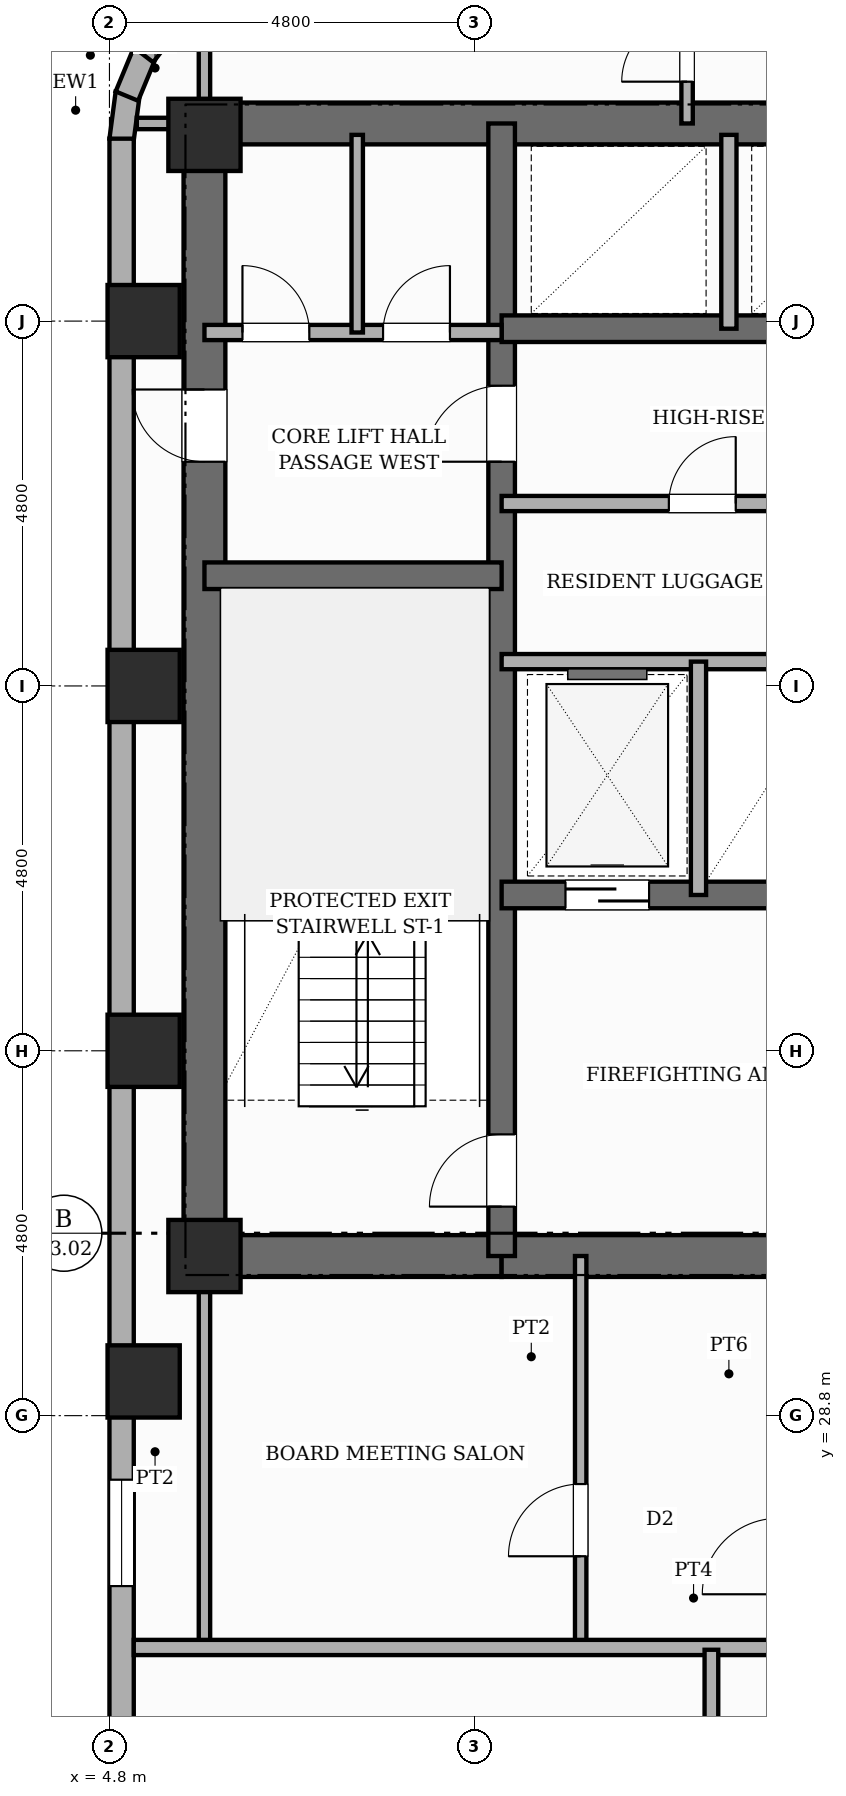
"""IFC4 building model, lengths in metres.
Left out: names, types, materials, properties, quantities, classifications, styles, units other than length and angle.
Written with IfcOpenShell. Run it as: python <this file> out.ifc"""

import sys

from ifc_helpers import new_model, si_unit, direction, frame, frame_2d, origin, origin_2d, place, context, subcontext, project, spatial, rectangle, extrude, element, fill, save


model = new_model("IFC4")
c1 = context("Model", 3, precision=1e-05, world=origin(), true_north=direction((0.0, 1.0)))
c2 = subcontext(c1, "Body", "Model", "MODEL_VIEW")
j1 = project(units=[si_unit("LENGTHUNIT", "METRE"), si_unit("PLANEANGLEUNIT", "RADIAN")], contexts=[c1])
p1 = place(None, origin())
s1 = spatial("IfcSite", under=j1, at=p1, CompositionType="ELEMENT")
p2 = place(p1, origin())
s2 = spatial("IfcBuilding", under=s1, at=p2, CompositionType="ELEMENT")
p3 = place(p2, frame((0.0, 0.0, 154.0)))
s3 = spatial("IfcBuildingStorey", under=s2, at=p3, CompositionType="ELEMENT", Elevation=154.0)
p4 = place(p3, frame((6.05, 30.625, 0.0), z_axis=(0.0, 0.0, 1.0), x_axis=(0.0, 1.0, 0.0)))
e1 = element("IfcWall", 1, at=p4, inside=s3, PredefinedType="SHEAR", context=c2, shape_type="SweptSolid", body=[
    extrude(rectangle(XDim=15.45, YDim=0.55, at=frame_2d((7.725, 0.0))), origin(), (0.0, 0.0, 1.0), 3.6),
])
p5 = place(p4, frame((10.725, 0.0, 0.0)))
e2 = element("IfcOpeningElement", 2, at=p5, cuts=e1, PredefinedType="OPENING", context=c2, shape_type="SweptSolid", body=[
    extrude(rectangle(XDim=0.95, YDim=2.15, at=frame_2d((0.475, 1.075))), frame((0.0, 0.285, 0.0), z_axis=(0.0, -1.0, 0.0), x_axis=(1.0, 0.0, 0.0)), (0.0, 0.0, 1.0), 0.57),
])
p6 = place(p3, frame((6.05, 45.8, 0.0), z_axis=(0.0, 0.0, 1.0), x_axis=(1.0, 0.0, 0.0)))
e3 = element("IfcWall", 3, at=p6, inside=s3, PredefinedType="SHEAR", context=c2, shape_type="SweptSolid", body=[
    extrude(rectangle(XDim=16.7, YDim=0.55, at=frame_2d((8.35, 0.0))), origin(), (0.0, 0.0, 1.0), 3.6),
])
p7 = place(p3, frame((6.05, 30.9, 0.0), z_axis=(0.0, 0.0, 1.0), x_axis=(1.0, 0.0, 0.0)))
e4 = element("IfcWall", 4, at=p7, inside=s3, PredefinedType="SHEAR", context=c2, shape_type="SweptSolid", body=[
    extrude(rectangle(XDim=3.91, YDim=0.55, at=frame_2d((1.955, 0.0))), origin(), (0.0, 0.0, 1.0), 3.6),
])
p8 = place(p3, frame((9.96, 30.9, 0.0), z_axis=(0.0, 0.0, 1.0), x_axis=(1.0, 0.0, 0.0)))
e5 = element("IfcWall", 5, at=p8, inside=s3, PredefinedType="SHEAR", context=c2, shape_type="SweptSolid", body=[
    extrude(rectangle(XDim=8.88, YDim=0.55, at=frame_2d((4.44, 0.0))), origin(), (0.0, 0.0, 1.0), 3.6),
])
p9 = place(p8, frame((4.09, 0.0, 0.0)))
e6 = element("IfcOpeningElement", 6, at=p9, cuts=e5, PredefinedType="OPENING", context=c2, shape_type="SweptSolid", body=[
    extrude(rectangle(XDim=1.0, YDim=2.15, at=frame_2d((0.5, 1.075))), frame((0.0, 0.285, 0.0), z_axis=(0.0, -1.0, 0.0), x_axis=(1.0, 0.0, 0.0)), (0.0, 0.0, 1.0), 0.57),
])
p10 = place(p3, frame((9.96, 30.9, 0.0), z_axis=(0.0, 0.0, 1.0), x_axis=(0.0, 1.0, 0.0)))
e7 = element("IfcWall", 7, at=p10, inside=s3, PredefinedType="SHEAR", context=c2, shape_type="SweptSolid", body=[
    extrude(rectangle(XDim=14.9, YDim=0.35, at=frame_2d((7.45, 0.0))), origin(), (0.0, 0.0, 1.0), 3.6),
])
p11 = place(p10, frame((0.65, 0.0, 0.0)))
e8 = element("IfcOpeningElement", 8, at=p11, cuts=e7, PredefinedType="OPENING", context=c2, shape_type="SweptSolid", body=[
    extrude(rectangle(XDim=0.95, YDim=2.1, at=frame_2d((0.475, 1.05))), frame((0.0, 0.185, 0.0), z_axis=(0.0, -1.0, 0.0), x_axis=(1.0, 0.0, 0.0)), (0.0, 0.0, 1.0), 0.37),
])
p12 = place(p10, frame((10.45, 0.0, 0.0)))
e9 = element("IfcOpeningElement", 9, at=p12, cuts=e7, PredefinedType="OPENING", context=c2, shape_type="SweptSolid", body=[
    extrude(rectangle(XDim=1.0, YDim=2.15, at=frame_2d((0.5, 1.075))), frame((0.0, 0.185, 0.0), z_axis=(0.0, -1.0, 0.0), x_axis=(1.0, 0.0, 0.0)), (0.0, 0.0, 1.0), 0.37),
])
p13 = place(p3, frame((6.05, 39.85, 0.0), z_axis=(0.0, 0.0, 1.0), x_axis=(1.0, 0.0, 0.0)))
e10 = element("IfcWall", 10, at=p13, inside=s3, PredefinedType="SHEAR", context=c2, shape_type="SweptSolid", body=[
    extrude(rectangle(XDim=3.91, YDim=0.35, at=frame_2d((1.955, 0.0))), origin(), (0.0, 0.0, 1.0), 3.6),
])
p14 = place(p3, frame((9.96, 35.65, 0.0), z_axis=(0.0, 0.0, 1.0), x_axis=(1.0, 0.0, 0.0)))
e11 = element("IfcWall", 11, at=p14, inside=s3, PredefinedType="SHEAR", context=c2, shape_type="SweptSolid", body=[
    extrude(rectangle(XDim=8.88, YDim=0.35, at=frame_2d((4.44, 0.0))), origin(), (0.0, 0.0, 1.0), 3.6),
])
p15 = place(p14, frame((0.84, 0.0, 0.0)))
e12 = element("IfcOpeningElement", 12, at=p15, cuts=e11, PredefinedType="OPENING", context=c2, shape_type="SweptSolid", body=[
    extrude(rectangle(XDim=1.1, YDim=2.15, at=frame_2d((0.55, 1.075))), frame((0.0, 0.185, 0.0), z_axis=(0.0, -1.0, 0.0), x_axis=(1.0, 0.0, 0.0)), (0.0, 0.0, 1.0), 0.37),
])
p16 = place(p14, frame((5.24, 0.0, 0.0)))
e13 = element("IfcOpeningElement", 13, at=p16, cuts=e11, PredefinedType="OPENING", context=c2, shape_type="SweptSolid", body=[
    extrude(rectangle(XDim=1.1, YDim=2.15, at=frame_2d((0.55, 1.075))), frame((0.0, 0.185, 0.0), z_axis=(0.0, -1.0, 0.0), x_axis=(1.0, 0.0, 0.0)), (0.0, 0.0, 1.0), 0.37),
])
p17 = place(p14, frame((7.5, 0.0, 0.0)))
e14 = element("IfcOpeningElement", 14, at=p17, cuts=e11, PredefinedType="OPENING", context=c2, shape_type="SweptSolid", body=[
    extrude(rectangle(XDim=0.88, YDim=2.1, at=frame_2d((0.44, 1.05))), frame((0.0, 0.185, 0.0), z_axis=(0.0, -1.0, 0.0), x_axis=(1.0, 0.0, 0.0)), (0.0, 0.0, 1.0), 0.37),
])
p18 = place(p3, frame((9.96, 43.1, 0.0), z_axis=(0.0, 0.0, 1.0), x_axis=(1.0, 0.0, 0.0)))
e15 = element("IfcWall", 15, at=p18, inside=s3, PredefinedType="SHEAR", context=c2, shape_type="SweptSolid", body=[
    extrude(rectangle(XDim=8.88, YDim=0.35, at=frame_2d((4.44, 0.0))), origin(), (0.0, 0.0, 1.0), 3.6),
])
for number, where, z_axis, x_axis in (
    (16, (5.25, 29.25, 0.0), (0.0, 0.0, 1.0), (1.0, 0.0, 0.0)),
    (17, (5.25, 33.6, 0.0), (0.0, 0.0, 1.0), (1.0, 0.0, 0.0)),
    (18, (5.25, 38.4, 0.0), (0.0, 0.0, 1.0), (1.0, 0.0, 0.0)),
    (19, (5.25, 43.2, 0.0), (0.0, 0.0, 1.0), (1.0, 0.0, 0.0)),
    (20, (6.05, 30.9, 0.0), (0.0, 0.0, 1.0), (1.0, 0.0, 0.0)),
    (21, (6.05, 45.65, 0.0), (0.0, 0.0, 1.0), (1.0, 0.0, 0.0)),
):
    element("IfcColumn", number, at=place(p3, frame(where, z_axis=z_axis, x_axis=x_axis)), inside=s3, PredefinedType="COLUMN", context=c2, shape_type="SweptSolid", body=[
        extrude(rectangle(XDim=0.95, YDim=0.95, at=origin_2d()), origin(), (0.0, 0.0, 1.0), 3.6),
    ])
for number, where, z_axis, x_axis in (
    (22, (4.958, 45.579, 0.0), (0.0, 0.0, 1.0), (0.131, 0.991, 0.0)),
    (23, (5.03, 46.16, 0.0), (0.0, 0.0, 1.0), (0.383, 0.924, 0.0)),
):
    element("IfcWall", number, at=place(p3, frame(where, z_axis=z_axis, x_axis=x_axis)), inside=s3, PredefinedType="STANDARD", context=c2, shape_type="SweptSolid", body=[
        extrude(rectangle(XDim=0.626, YDim=0.32, at=frame_2d((0.313, 0.0))), origin(), (0.0, 0.0, 1.0), 3.36),
    ])
p19 = place(p3, frame((5.248, 46.703, 0.0), z_axis=(0.0, 0.0, 1.0), x_axis=(0.608938521285, 0.7932174212, 0.0)))
e24 = element("IfcWall", 24, at=p19, inside=s3, PredefinedType="STANDARD", context=c2, shape_type="SweptSolid", body=[
    extrude(rectangle(XDim=0.627, YDim=0.32, at=frame_2d((0.313, 0.0))), origin(), (0.0, 0.0, 1.0), 3.36),
])
p20 = place(p3, frame((4.96, 12.0, 0.0), z_axis=(0.0, 0.0, 1.0), x_axis=(0.0, 1.0, 0.0)))
e25 = element("IfcWall", 25, at=p20, inside=s3, PredefinedType="STANDARD", context=c2, shape_type="SweptSolid", body=[
    extrude(rectangle(XDim=33.6, YDim=0.32, at=frame_2d((16.8, 0.0))), origin(), (0.0, 0.0, 1.0), 2.54),
])
p21 = place(p20, frame((9.05, 0.0, 0.0)))
e26 = element("IfcOpeningElement", 26, at=p21, cuts=e25, PredefinedType="OPENING", context=c2, shape_type="SweptSolid", body=[
    extrude(rectangle(XDim=1.1, YDim=2.15, at=frame_2d((0.55, 1.075))), frame((0.0, 0.17, 0.0), z_axis=(0.0, -1.0, 0.0), x_axis=(1.0, 0.0, 0.0)), (0.0, 0.0, 1.0), 0.34),
])
p22 = place(p20, frame((3.335, 0.0, 0.65)))
e27 = element("IfcOpeningElement", 27, at=p22, cuts=e25, PredefinedType="OPENING", context=c2, shape_type="SweptSolid", body=[
    extrude(rectangle(XDim=1.4, YDim=1.1, at=frame_2d((0.7, 0.55))), frame((0.0, 0.17, 0.0), z_axis=(0.0, -1.0, 0.0), x_axis=(1.0, 0.0, 0.0)), (0.0, 0.0, 1.0), 0.34),
])
p23 = place(p20, frame((0.683, 0.0, 0.45)))
e28 = element("IfcOpeningElement", 28, at=p23, cuts=e25, PredefinedType="OPENING", context=c2, shape_type="SweptSolid", body=[
    extrude(rectangle(XDim=0.95, YDim=1.8, at=frame_2d((0.475, 0.9))), frame((0.0, 0.17, 0.0), z_axis=(0.0, -1.0, 0.0), x_axis=(1.0, 0.0, 0.0)), (0.0, 0.0, 1.0), 0.34),
])
p24 = place(p20, frame((5.466, 0.0, 0.45)))
e29 = element("IfcOpeningElement", 29, at=p24, cuts=e25, PredefinedType="OPENING", context=c2, shape_type="SweptSolid", body=[
    extrude(rectangle(XDim=0.95, YDim=1.8, at=frame_2d((0.475, 0.9))), frame((0.0, 0.17, 0.0), z_axis=(0.0, -1.0, 0.0), x_axis=(1.0, 0.0, 0.0)), (0.0, 0.0, 1.0), 0.34),
])
p25 = place(p20, frame((10.548, 0.0, 0.45)))
e30 = element("IfcOpeningElement", 30, at=p25, cuts=e25, PredefinedType="OPENING", context=c2, shape_type="SweptSolid", body=[
    extrude(rectangle(XDim=0.75, YDim=1.8, at=frame_2d((0.375, 0.9))), frame((0.0, 0.17, 0.0), z_axis=(0.0, -1.0, 0.0), x_axis=(1.0, 0.0, 0.0)), (0.0, 0.0, 1.0), 0.34),
])
p26 = place(p20, frame((14.558, 0.0, 0.65)))
e31 = element("IfcOpeningElement", 31, at=p26, cuts=e25, PredefinedType="OPENING", context=c2, shape_type="SweptSolid", body=[
    extrude(rectangle(XDim=1.4, YDim=1.1, at=frame_2d((0.7, 0.55))), frame((0.0, 0.17, 0.0), z_axis=(0.0, -1.0, 0.0), x_axis=(1.0, 0.0, 0.0)), (0.0, 0.0, 1.0), 0.34),
])
p27 = place(p3, frame((9.96, 38.72, 0.0), z_axis=(0.0, 0.0, 1.0), x_axis=(1.0, 0.0, 0.0)))
e32 = element("IfcWall", 32, at=p27, inside=s3, PredefinedType="POLYGONAL", context=c2, shape_type="SweptSolid", body=[
    extrude(rectangle(XDim=7.06, YDim=0.2, at=frame_2d((3.53, 0.0))), origin(), (0.0, 0.0, 1.0), 3.36),
])
p28 = place(p3, frame((12.55, 35.65, 0.0), z_axis=(0.0, 0.0, 1.0), x_axis=(0.0, 1.0, 0.0)))
e33 = element("IfcWall", 33, at=p28, inside=s3, PredefinedType="POLYGONAL", context=c2, shape_type="SweptSolid", body=[
    extrude(rectangle(XDim=3.07, YDim=0.2, at=frame_2d((1.535, 0.0))), origin(), (0.0, 0.0, 1.0), 3.36),
])
p29 = place(p3, frame((9.96, 40.8, 0.0), z_axis=(0.0, 0.0, 1.0), x_axis=(1.0, 0.0, 0.0)))
e34 = element("IfcWall", 34, at=p29, inside=s3, PredefinedType="POLYGONAL", context=c2, shape_type="SweptSolid", body=[
    extrude(rectangle(XDim=8.88, YDim=0.2, at=frame_2d((4.44, 0.0))), origin(), (0.0, 0.0, 1.0), 3.36),
])
p30 = place(p29, frame((7.5, 0.0, 0.0)))
e35 = element("IfcOpeningElement", 35, at=p30, cuts=e34, PredefinedType="OPENING", context=c2, shape_type="SweptSolid", body=[
    extrude(rectangle(XDim=0.88, YDim=2.1, at=frame_2d((0.44, 1.05))), frame((0.0, 0.11, 0.0), z_axis=(0.0, -1.0, 0.0), x_axis=(1.0, 0.0, 0.0)), (0.0, 0.0, 1.0), 0.22),
])
p31 = place(p29, frame((2.2, 0.0, 0.0)))
e36 = element("IfcOpeningElement", 36, at=p31, cuts=e34, PredefinedType="OPENING", context=c2, shape_type="SweptSolid", body=[
    extrude(rectangle(XDim=0.88, YDim=2.1, at=frame_2d((0.44, 1.05))), frame((0.0, 0.11, 0.0), z_axis=(0.0, -1.0, 0.0), x_axis=(1.0, 0.0, 0.0)), (0.0, 0.0, 1.0), 0.22),
])
p32 = place(p29, frame((5.5, 0.0, 0.0)))
e37 = element("IfcOpeningElement", 37, at=p32, cuts=e34, PredefinedType="OPENING", context=c2, shape_type="SweptSolid", body=[
    extrude(rectangle(XDim=0.88, YDim=2.1, at=frame_2d((0.44, 1.05))), frame((0.0, 0.11, 0.0), z_axis=(0.0, -1.0, 0.0), x_axis=(1.0, 0.0, 0.0)), (0.0, 0.0, 1.0), 0.22),
])
p33 = place(p3, frame((6.05, 43.05, 0.0), z_axis=(0.0, 0.0, 1.0), x_axis=(1.0, 0.0, 0.0)))
e38 = element("IfcWall", 38, at=p33, inside=s3, PredefinedType="POLYGONAL", context=c2, shape_type="SweptSolid", body=[
    extrude(rectangle(XDim=3.91, YDim=0.2, at=frame_2d((1.955, 0.0))), origin(), (0.0, 0.0, 1.0), 2.54),
])
p34 = place(p33, frame((0.5, 0.0, 0.0)))
e39 = element("IfcOpeningElement", 39, at=p34, cuts=e38, PredefinedType="OPENING", context=c2, shape_type="SweptSolid", body=[
    extrude(rectangle(XDim=0.88, YDim=2.1, at=frame_2d((0.44, 1.05))), frame((0.0, 0.11, 0.0), z_axis=(0.0, -1.0, 0.0), x_axis=(1.0, 0.0, 0.0)), (0.0, 0.0, 1.0), 0.22),
])
p35 = place(p33, frame((2.35, 0.0, 0.0)))
e40 = element("IfcOpeningElement", 40, at=p35, cuts=e38, PredefinedType="OPENING", context=c2, shape_type="SweptSolid", body=[
    extrude(rectangle(XDim=0.88, YDim=2.1, at=frame_2d((0.44, 1.05))), frame((0.0, 0.11, 0.0), z_axis=(0.0, -1.0, 0.0), x_axis=(1.0, 0.0, 0.0)), (0.0, 0.0, 1.0), 0.22),
])
p36 = place(p3, frame((12.95, 43.1, 0.0), z_axis=(0.0, 0.0, 1.0), x_axis=(0.0, 1.0, 0.0)))
e41 = element("IfcWall", 41, at=p36, inside=s3, PredefinedType="POLYGONAL", context=c2, shape_type="SweptSolid", body=[
    extrude(rectangle(XDim=2.55, YDim=0.2, at=frame_2d((1.275, 0.0))), origin(), (0.0, 0.0, 1.0), 3.36),
])
p37 = place(p3, frame((8.06, 43.05, 0.0), z_axis=(0.0, 0.0, 1.0), x_axis=(0.0, 1.0, 0.0)))
e42 = element("IfcWall", 42, at=p37, inside=s3, PredefinedType="PARTITIONING", context=c2, shape_type="SweptSolid", body=[
    extrude(rectangle(XDim=2.6, YDim=0.15, at=frame_2d((1.3, 0.0))), origin(), (0.0, 0.0, 1.0), 3.36),
])
p38 = place(p3, frame((6.05, 25.75, 0.0), z_axis=(0.0, 0.0, 1.0), x_axis=(0.0, 1.0, 0.0)))
e43 = element("IfcWall", 43, at=p38, inside=s3, PredefinedType="PARTITIONING", context=c2, shape_type="SweptSolid", body=[
    extrude(rectangle(XDim=5.15, YDim=0.15, at=frame_2d((2.575, 0.0))), origin(), (0.0, 0.0, 1.0), 3.36),
])
p39 = place(p3, frame((11.0, 25.75, 0.0), z_axis=(0.0, 0.0, 1.0), x_axis=(0.0, 1.0, 0.0)))
e44 = element("IfcWall", 44, at=p39, inside=s3, PredefinedType="PARTITIONING", context=c2, shape_type="SweptSolid", body=[
    extrude(rectangle(XDim=5.15, YDim=0.15, at=frame_2d((2.575, 0.0))), origin(), (0.0, 0.0, 1.0), 3.36),
])
p40 = place(p39, frame((1.2, 0.0, 0.0)))
e45 = element("IfcOpeningElement", 45, at=p40, cuts=e44, PredefinedType="OPENING", context=c2, shape_type="SweptSolid", body=[
    extrude(rectangle(XDim=0.95, YDim=2.15, at=frame_2d((0.475, 1.075))), frame((0.0, 0.085, 0.0), z_axis=(0.0, -1.0, 0.0), x_axis=(1.0, 0.0, 0.0)), (0.0, 0.0, 1.0), 0.17),
])
p41 = place(p3, frame((5.12, 25.75, 0.0), z_axis=(0.0, 0.0, 1.0), x_axis=(1.0, 0.0, 0.0)))
e46 = element("IfcWall", 46, at=p41, inside=s3, PredefinedType="PARTITIONING", context=c2, shape_type="SweptSolid", body=[
    extrude(rectangle(XDim=14.73, YDim=0.2, at=frame_2d((7.365, 0.0))), origin(), (0.0, 0.0, 1.0), 3.36),
])
p42 = place(p3, frame((12.72, 22.34, 0.0), z_axis=(0.0, 0.0, 1.0), x_axis=(0.0, 1.0, 0.0)))
e47 = element("IfcWall", 47, at=p42, inside=s3, PredefinedType="PLUMBINGWALL", context=c2, shape_type="SweptSolid", body=[
    extrude(rectangle(XDim=3.38, YDim=0.18, at=frame_2d((1.69, 0.0))), origin(), (0.0, 0.0, 1.0), 3.36),
])
p43 = place(p3, frame((5.16, 45.8, 0.0), z_axis=(0.0, 0.0, 1.0), x_axis=(1.0, 0.0, 0.0)))
e48 = element("IfcWall", 48, at=p43, inside=s3, PredefinedType="PARTITIONING", context=c2, shape_type="SweptSolid", body=[
    extrude(rectangle(XDim=0.89, YDim=0.15, at=frame_2d((0.445, 0.0))), origin(), (0.0, 0.0, 1.0), 3.36),
])
p44 = place(p3, frame((6.05, 45.8, 0.0), z_axis=(0.0, 0.0, 1.0), x_axis=(0.0, 1.0, 0.0)))
e49 = element("IfcWall", 49, at=p44, inside=s3, PredefinedType="PARTITIONING", context=c2, shape_type="SweptSolid", body=[
    extrude(rectangle(XDim=1.46, YDim=0.15, at=frame_2d((0.73, 0.0))), origin(), (0.0, 0.0, 1.0), 3.36),
])
p45 = place(p3, frame((12.4, 45.8, 0.0), z_axis=(0.0, 0.0, 1.0), x_axis=(0.0, 1.0, 0.0)))
e50 = element("IfcWall", 50, at=p45, inside=s3, PredefinedType="PARTITIONING", context=c2, shape_type="SweptSolid", body=[
    extrude(rectangle(XDim=1.88, YDim=0.15, at=frame_2d((0.94, 0.0))), origin(), (0.0, 0.0, 1.0), 3.36),
])
p46 = place(p45, frame((0.55, 0.0, 0.0)))
e51 = element("IfcOpeningElement", 51, at=p46, cuts=e50, PredefinedType="OPENING", context=c2, shape_type="SweptSolid", body=[
    extrude(rectangle(XDim=0.86, YDim=2.1, at=frame_2d((0.43, 1.05))), frame((0.0, 0.085, 0.0), z_axis=(0.0, -1.0, 0.0), x_axis=(1.0, 0.0, 0.0)), (0.0, 0.0, 1.0), 0.17),
])
p47 = place(p26, origin())
e52 = element("IfcWindow", 52, at=p47, inside=s3, PartitioningType="SINGLE_PANEL", PredefinedType="WINDOW", context=c2, shape_type="SweptSolid", body=[
    extrude(rectangle(XDim=1.4, YDim=1.1, at=frame_2d((0.7, 0.55))), frame((0.0, 0.03, 0.0), z_axis=(0.0, -1.0, 0.0), x_axis=(1.0, 0.0, 0.0)), (0.0, 0.0, 1.0), 0.06),
])
fill(e31, e52)
p48 = place(p11, origin())
e53 = element("IfcDoor", 53, at=p48, inside=s3, OperationType="SINGLE_SWING_LEFT", PredefinedType="DOOR", context=c2, shape_type="SweptSolid", body=[
    extrude(rectangle(XDim=0.95, YDim=2.1, at=frame_2d((0.475, 1.05))), frame((0.0, 0.025, 0.0), z_axis=(0.0, -1.0, 0.0), x_axis=(1.0, 0.0, 0.0)), (0.0, 0.0, 1.0), 0.05),
])
fill(e8, e53)
p49 = place(p15, origin())
e54 = element("IfcDoor", 54, at=p49, inside=s3, OperationType="SLIDING_TO_LEFT", PredefinedType="DOOR", context=c2, shape_type="SweptSolid", body=[
    extrude(rectangle(XDim=1.1, YDim=2.15, at=frame_2d((0.55, 1.075))), frame((0.0, 0.025, 0.0), z_axis=(0.0, -1.0, 0.0), x_axis=(1.0, 0.0, 0.0)), (0.0, 0.0, 1.0), 0.05),
])
fill(e12, e54)
p50 = place(p12, origin())
e55 = element("IfcDoor", 55, at=p50, inside=s3, OperationType="SINGLE_SWING_LEFT", PredefinedType="DOOR", context=c2, shape_type="SweptSolid", body=[
    extrude(rectangle(XDim=1.0, YDim=2.15, at=frame_2d((0.5, 1.075))), frame((0.0, 0.025, 0.0), z_axis=(0.0, -1.0, 0.0), x_axis=(1.0, 0.0, 0.0)), (0.0, 0.0, 1.0), 0.05),
])
fill(e9, e55)
p51 = place(p5, origin())
e56 = element("IfcDoor", 56, at=p51, inside=s3, OperationType="SINGLE_SWING_RIGHT", PredefinedType="DOOR", context=c2, shape_type="SweptSolid", body=[
    extrude(rectangle(XDim=0.95, YDim=2.15, at=frame_2d((0.475, 1.075))), frame((0.0, 0.025, 0.0), z_axis=(0.0, -1.0, 0.0), x_axis=(1.0, 0.0, 0.0)), (0.0, 0.0, 1.0), 0.05),
])
fill(e2, e56)
p52 = place(p34, origin())
e57 = element("IfcDoor", 57, at=p52, inside=s3, OperationType="SINGLE_SWING_LEFT", PredefinedType="DOOR", context=c2, shape_type="SweptSolid", body=[
    extrude(rectangle(XDim=0.88, YDim=2.1, at=frame_2d((0.44, 1.05))), frame((0.0, 0.025, 0.0), z_axis=(0.0, -1.0, 0.0), x_axis=(1.0, 0.0, 0.0)), (0.0, 0.0, 1.0), 0.05),
])
fill(e39, e57)
p53 = place(p35, origin())
e58 = element("IfcDoor", 58, at=p53, inside=s3, OperationType="SINGLE_SWING_RIGHT", PredefinedType="DOOR", context=c2, shape_type="SweptSolid", body=[
    extrude(rectangle(XDim=0.88, YDim=2.1, at=frame_2d((0.44, 1.05))), frame((0.0, 0.025, 0.0), z_axis=(0.0, -1.0, 0.0), x_axis=(1.0, 0.0, 0.0)), (0.0, 0.0, 1.0), 0.05),
])
fill(e40, e58)
p54 = place(p31, origin())
e59 = element("IfcDoor", 59, at=p54, inside=s3, OperationType="SINGLE_SWING_RIGHT", PredefinedType="DOOR", context=c2, shape_type="SweptSolid", body=[
    extrude(rectangle(XDim=0.88, YDim=2.1, at=frame_2d((0.44, 1.05))), frame((0.0, 0.025, 0.0), z_axis=(0.0, -1.0, 0.0), x_axis=(1.0, 0.0, 0.0)), (0.0, 0.0, 1.0), 0.05),
])
fill(e36, e59)
p55 = place(p40, origin())
e60 = element("IfcDoor", 60, at=p55, inside=s3, OperationType="SINGLE_SWING_LEFT", PredefinedType="DOOR", context=c2, shape_type="SweptSolid", body=[
    extrude(rectangle(XDim=0.95, YDim=2.15, at=frame_2d((0.475, 1.075))), frame((0.0, 0.025, 0.0), z_axis=(0.0, -1.0, 0.0), x_axis=(1.0, 0.0, 0.0)), (0.0, 0.0, 1.0), 0.05),
])
fill(e45, e60)
p56 = place(p46, origin())
e61 = element("IfcDoor", 61, at=p56, inside=s3, OperationType="SINGLE_SWING_LEFT", PredefinedType="DOOR", context=c2, shape_type="SweptSolid", body=[
    extrude(rectangle(XDim=0.86, YDim=2.1, at=frame_2d((0.43, 1.05))), frame((0.0, 0.025, 0.0), z_axis=(0.0, -1.0, 0.0), x_axis=(1.0, 0.0, 0.0)), (0.0, 0.0, 1.0), 0.05),
])
fill(e51, e61)
save(model, sys.argv[1])
